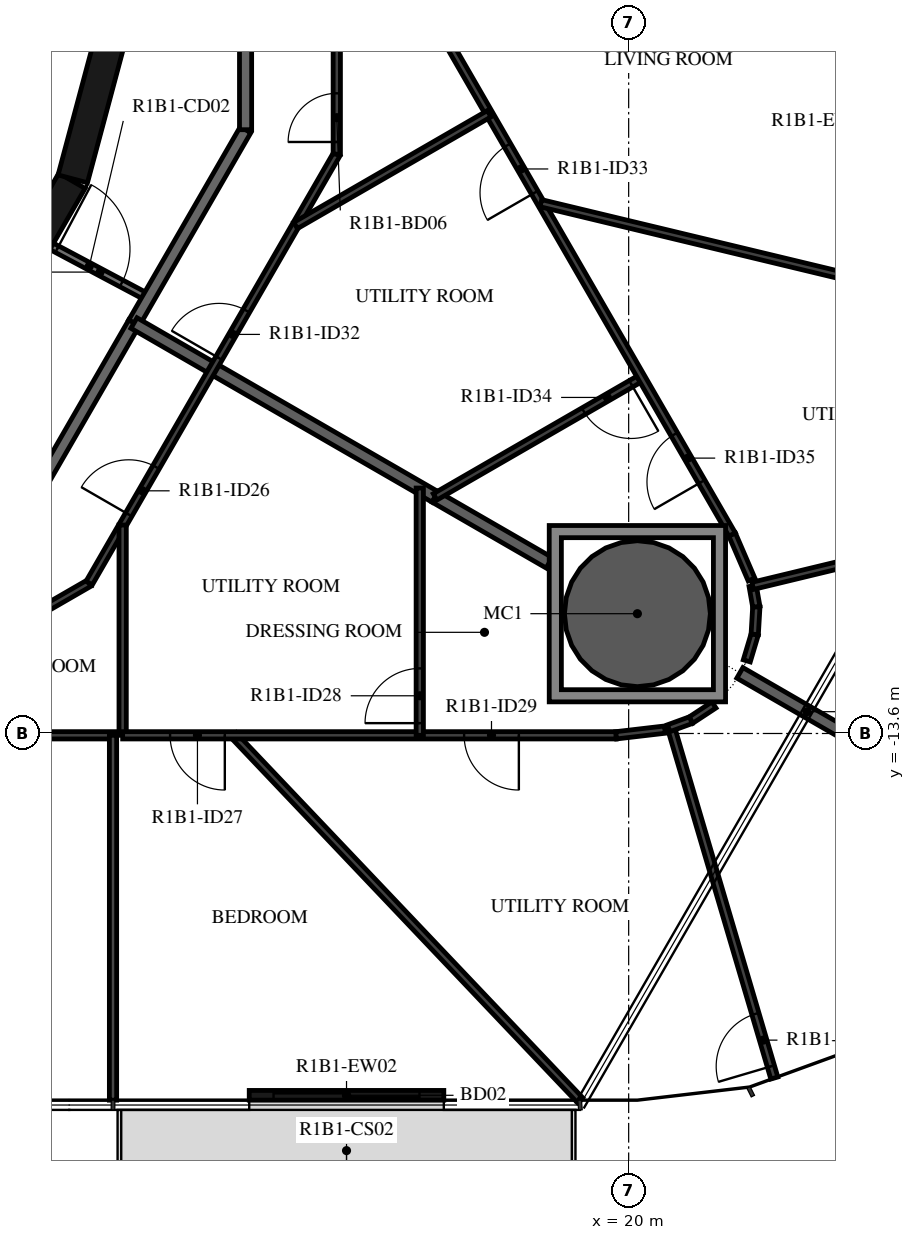
"""IFC4 building model, lengths in metres.
Left out: names, types, materials, properties, quantities, classifications, styles, units other than length and angle.
Written with IfcOpenShell. Run it as: python <this file> out.ifc"""

import sys

from ifc_helpers import new_model, si_unit, direction, frame, frame_2d, origin, origin_2d, place, context, subcontext, project, spatial, polyline, rectangle, hollow_circle, outline, extrude, element, fill, save


model = new_model("IFC4")
c1 = context("Model", 3, precision=1e-05, world=origin(), true_north=direction((0.0, 1.0)))
c2 = subcontext(c1, "Body", "Model", "MODEL_VIEW")
j1 = project(units=[si_unit("LENGTHUNIT", "METRE"), si_unit("PLANEANGLEUNIT", "RADIAN")], contexts=[c1])
p1 = place(None, origin())
s1 = spatial("IfcSite", under=j1, at=p1, CompositionType="ELEMENT")
p2 = place(p1, origin())
s2 = spatial("IfcBuilding", under=s1, at=p2, CompositionType="ELEMENT")
p3 = place(p2, frame((0.0, 0.0, 48.9)))
s3 = spatial("IfcBuildingStorey", under=s2, at=p3, CompositionType="ELEMENT", Elevation=48.9)
p4 = place(p3, frame((20.144, -11.63, -0.38), z_axis=(0.0, 0.0, 1.0), x_axis=(1.0, 0.0, 0.0)))
e1 = element("IfcColumn", 1, at=p4, inside=s3, PredefinedType="COLUMN", context=c2, shape_type="SweptSolid", body=[
    extrude(hollow_circle(Radius=1.2, WallThickness=0.06, at=origin_2d()), origin(), (0.0, 0.0, 1.0), 3.5),
])
p5 = place(p3, frame((13.76, -19.55, 0.0), z_axis=(0.0, 0.0, 1.0), x_axis=(1.0, 0.0, 0.0)))
e2 = element("IfcWall", 2, at=p5, inside=s3, PredefinedType="STANDARD", context=c2, shape_type="SweptSolid", body=[
    extrude(rectangle(XDim=3.2, YDim=0.16, at=frame_2d((1.6, 0.0))), origin(), (0.0, 0.0, 1.0), 3.12),
])
p6 = place(p5, frame((0.4, 0.0, 0.0)))
e3 = element("IfcOpeningElement", 3, at=p6, cuts=e2, PredefinedType="OPENING", context=c2, shape_type="SweptSolid", body=[
    extrude(rectangle(XDim=2.4, YDim=2.4, at=frame_2d((1.2, 1.2))), frame((0.0, 0.09, 0.0), z_axis=(0.0, -1.0, 0.0), x_axis=(1.0, 0.0, 0.0)), (0.0, 0.0, 1.0), 0.18),
])
for number, where, z_axis, x_axis in (
    (4, (9.329, -7.137, 0.0), (0.0, 0.0, 1.0), (0.5, 0.866, 0.0)),
    (5, (10.858, -4.479, 0.0), (0.0, 0.0, 1.0), (0.259, 0.966, 0.0)),
):
    element("IfcWall", number, at=place(p3, frame(where, z_axis=z_axis, x_axis=x_axis)), inside=s3, PredefinedType="SHEAR", context=c2, shape_type="SweptSolid", body=[
        extrude(rectangle(XDim=3.033, YDim=0.5, at=frame_2d((1.516, 0.0))), origin(), (0.0, 0.0, 1.0), 3.12),
    ])
p7 = place(p3, frame((10.511, -5.589, 0.0), z_axis=(0.0, 0.0, 1.0), x_axis=(0.88294043061, -0.469485032769, 0.0)))
e6 = element("IfcWall", 6, at=p7, inside=s3, PredefinedType="PARTITIONING", context=c2, shape_type="SweptSolid", body=[
    extrude(rectangle(XDim=1.804, YDim=0.12, at=frame_2d((0.902, 0.0))), origin(), (0.0, 0.0, 1.0), 3.12),
])
p8 = place(p7, frame((0.1, 0.0, 0.0)))
e7 = element("IfcOpeningElement", 7, at=p8, cuts=e6, PredefinedType="OPENING", context=c2, shape_type="SweptSolid", body=[
    extrude(rectangle(XDim=1.2, YDim=2.1, at=frame_2d((0.6, 1.05))), frame((0.0, 0.07, 0.0), z_axis=(0.0, -1.0, 0.0), x_axis=(1.0, 0.0, 0.0)), (0.0, 0.0, 1.0), 0.14),
])
p9 = place(p3, frame((11.865, -6.85, 0.0), z_axis=(0.0, 0.0, 1.0), x_axis=(0.499987270552, 0.86603275301, 0.0)))
e8 = element("IfcWall", 8, at=p9, inside=s3, PredefinedType="STANDARD", context=c2, shape_type="SweptSolid", body=[
    extrude(rectangle(XDim=3.671, YDim=0.2, at=frame_2d((1.835, 0.0))), origin(), (0.0, 0.0, 1.0), 3.12),
])
p10 = place(p3, frame((13.7, -3.671, 0.0), z_axis=(0.0, 0.0, 1.0), x_axis=(0.0, 1.0, 0.0)))
e9 = element("IfcWall", 9, at=p10, inside=s3, PredefinedType="STANDARD", context=c2, shape_type="SweptSolid", body=[
    extrude(rectangle(XDim=7.146, YDim=0.2, at=frame_2d((3.573, 0.0))), origin(), (0.0, 0.0, 1.0), 3.12),
])
p11 = place(p10, frame((5.947, 0.0, 0.0)))
e10 = element("IfcOpeningElement", 10, at=p11, cuts=e9, PredefinedType="OPENING", context=c2, shape_type="SweptSolid", body=[
    extrude(rectangle(XDim=1.0, YDim=2.1, at=frame_2d((0.5, 1.05))), frame((0.0, 0.11, 0.0), z_axis=(0.0, -1.0, 0.0), x_axis=(1.0, 0.0, 0.0)), (0.0, 0.0, 1.0), 0.22),
])
p12 = place(p3, frame((10.029, -10.029, 0.0), z_axis=(0.0, 0.0, 1.0), x_axis=(0.50001606911, 0.866016126081, 0.0)))
e11 = element("IfcWall", 11, at=p12, inside=s3, PredefinedType="STANDARD", context=c2, shape_type="SweptSolid", body=[
    extrude(rectangle(XDim=3.671, YDim=0.2, at=frame_2d((1.835, 0.0))), origin(), (0.0, 0.0, 1.0), 3.12),
])
p13 = place(p3, frame((16.817, -9.709, 0.0), z_axis=(0.0, 0.0, 1.0), x_axis=(-0.86604338933, 0.499968846828, 0.0)))
e12 = element("IfcWall", 12, at=p13, inside=s3, PredefinedType="STANDARD", context=c2, shape_type="SweptSolid", body=[
    extrude(rectangle(XDim=5.718, YDim=0.2, at=frame_2d((2.859, 0.0))), origin(), (0.0, 0.0, 1.0), 3.12),
])
p14 = place(p3, frame((27.025, -15.603, 0.0), z_axis=(0.0, 0.0, 1.0), x_axis=(-0.866020924479, 0.500007758305, 0.0)))
e13 = element("IfcWall", 13, at=p14, inside=s3, PredefinedType="STANDARD", context=c2, shape_type="SweptSolid", body=[
    extrude(rectangle(XDim=6.0, YDim=0.2, at=frame_2d((3.0, 0.0))), origin(), (0.0, 0.0, 1.0), 3.12),
])
p15 = place(p3, frame((18.694, -10.793, 0.0), z_axis=(0.0, 0.0, 1.0), x_axis=(-0.866009251978, 0.500027974705, 0.0)))
e14 = element("IfcWall", 14, at=p15, inside=s3, PredefinedType="STANDARD", context=c2, shape_type="SweptSolid", body=[
    extrude(rectangle(XDim=2.167, YDim=0.2, at=frame_2d((1.084, 0.0))), origin(), (0.0, 0.0, 1.0), 3.12),
])
p16 = place(p3, frame((4.613, -14.888, 0.0), z_axis=(0.0, 0.0, 1.0), x_axis=(0.866025608725, 0.499999645032, 0.0)))
e15 = element("IfcWall", 15, at=p16, inside=s3, PredefinedType="PARTITIONING", context=c2, shape_type="SweptSolid", body=[
    extrude(rectangle(XDim=7.522, YDim=0.12, at=frame_2d((3.761, 0.0))), origin(), (0.0, 0.0, 1.0), 3.12),
])
p17 = place(p16, frame((4.017, 0.0, 0.0)))
e16 = element("IfcOpeningElement", 16, at=p17, cuts=e15, PredefinedType="OPENING", context=c2, shape_type="SweptSolid", body=[
    extrude(rectangle(XDim=0.8, YDim=2.1, at=frame_2d((0.4, 1.05))), frame((0.0, 0.07, 0.0), z_axis=(0.0, -1.0, 0.0), x_axis=(1.0, 0.0, 0.0)), (0.0, 0.0, 1.0), 0.14),
])
p18 = place(p3, frame((11.127, -11.127, 0.0), z_axis=(0.0, 0.0, 1.0), x_axis=(0.499987950692, 0.866032360344, 0.0)))
e17 = element("IfcWall", 17, at=p18, inside=s3, PredefinedType="PARTITIONING", context=c2, shape_type="SweptSolid", body=[
    extrude(rectangle(XDim=8.146, YDim=0.12, at=frame_2d((4.073, 0.0))), origin(), (0.0, 0.0, 1.0), 3.12),
])
p19 = place(p18, frame((1.303, 0.0, 0.0)))
e18 = element("IfcOpeningElement", 18, at=p19, cuts=e17, PredefinedType="OPENING", context=c2, shape_type="SweptSolid", body=[
    extrude(rectangle(XDim=0.9, YDim=2.1, at=frame_2d((0.45, 1.05))), frame((0.0, 0.07, 0.0), z_axis=(0.0, -1.0, 0.0), x_axis=(1.0, 0.0, 0.0)), (0.0, 0.0, 1.0), 0.14),
])
p20 = place(p18, frame((4.273, 0.0, 0.0)))
e19 = element("IfcOpeningElement", 19, at=p20, cuts=e17, PredefinedType="OPENING", context=c2, shape_type="SweptSolid", body=[
    extrude(rectangle(XDim=0.9, YDim=2.1, at=frame_2d((0.45, 1.05))), frame((0.0, 0.07, 0.0), z_axis=(0.0, -1.0, 0.0), x_axis=(1.0, 0.0, 0.0)), (0.0, 0.0, 1.0), 0.14),
])
p21 = place(p3, frame((11.56, -13.63, 0.0), z_axis=(0.0, 0.0, 1.0), x_axis=(-1.0, 0.0, 0.0)))
e20 = element("IfcWall", 20, at=p21, inside=s3, PredefinedType="PARTITIONING", context=c2, shape_type="SweptSolid", body=[
    extrude(rectangle(XDim=4.768, YDim=0.12, at=frame_2d((2.384, 0.0))), origin(), (0.0, 0.0, 1.0), 3.12),
])
p22 = place(p3, frame((11.52, -19.63, 0.0), z_axis=(0.0, 0.0, 1.0), x_axis=(0.0, 1.0, 0.0)))
e21 = element("IfcWall", 21, at=p22, inside=s3, PredefinedType="PARTITIONING", context=c2, shape_type="SweptSolid", body=[
    extrude(rectangle(XDim=6.0, YDim=0.12, at=frame_2d((3.0, 0.0))), origin(), (0.0, 0.0, 1.0), 2.73),
])
p23 = place(p3, frame((11.678, -13.63, 0.0), z_axis=(0.0, 0.0, 1.0), x_axis=(0.0, 1.0, 0.0)))
e22 = element("IfcWall", 22, at=p23, inside=s3, PredefinedType="PARTITIONING", context=c2, shape_type="SweptSolid", body=[
    extrude(rectangle(XDim=3.458, YDim=0.12, at=frame_2d((1.729, 0.0))), origin(), (0.0, 0.0, 1.0), 3.12),
])
p24 = place(p3, frame((19.2, -19.63, 0.0), z_axis=(0.0, 0.0, 1.0), x_axis=(-0.688544699396, 0.72519390299, 0.0)))
e23 = element("IfcWall", 23, at=p24, inside=s3, PredefinedType="PARTITIONING", context=c2, shape_type="SweptSolid", body=[
    extrude(rectangle(XDim=8.274, YDim=0.12, at=frame_2d((4.137, 0.0))), origin(), (0.0, 0.0, 1.0), 3.12),
])
p25 = place(p3, frame((19.794, -13.63, 0.0), z_axis=(0.0, 0.0, 1.0), x_axis=(-1.0, 0.0, 0.0)))
e24 = element("IfcWall", 24, at=p25, inside=s3, PredefinedType="PARTITIONING", context=c2, shape_type="SweptSolid", body=[
    extrude(rectangle(XDim=8.116, YDim=0.12, at=frame_2d((4.058, 0.0))), origin(), (0.0, 0.0, 1.0), 3.12),
])
p26 = place(p25, frame((6.436, 0.0, 0.0)))
e25 = element("IfcOpeningElement", 25, at=p26, cuts=e24, PredefinedType="OPENING", context=c2, shape_type="SweptSolid", body=[
    extrude(rectangle(XDim=0.9, YDim=2.1, at=frame_2d((0.45, 1.05))), frame((0.0, 0.07, 0.0), z_axis=(0.0, -1.0, 0.0), x_axis=(1.0, 0.0, 0.0)), (0.0, 0.0, 1.0), 0.14),
])
p27 = place(p25, frame((1.6, 0.0, 0.0)))
e26 = element("IfcOpeningElement", 26, at=p27, cuts=e24, PredefinedType="OPENING", context=c2, shape_type="SweptSolid", body=[
    extrude(rectangle(XDim=0.9, YDim=2.1, at=frame_2d((0.45, 1.05))), frame((0.0, 0.07, 0.0), z_axis=(0.0, -1.0, 0.0), x_axis=(1.0, 0.0, 0.0)), (0.0, 0.0, 1.0), 0.14),
])
p28 = place(p3, frame((22.396, -19.266, 0.0), z_axis=(0.0, 0.0, 1.0), x_axis=(-0.282896205585, 0.959150528783, 0.0)))
e27 = element("IfcWall", 27, at=p28, inside=s3, PredefinedType="PARTITIONING", context=c2, shape_type="SweptSolid", body=[
    extrude(rectangle(XDim=6.012, YDim=0.12, at=frame_2d((3.006, 0.0))), origin(), (0.0, 0.0, 1.0), 3.12),
])
p29 = place(p28, frame((0.2, 0.0, 0.0)))
e28 = element("IfcOpeningElement", 28, at=p29, cuts=e27, PredefinedType="OPENING", context=c2, shape_type="SweptSolid", body=[
    extrude(rectangle(XDim=0.9, YDim=2.1, at=frame_2d((0.45, 1.05))), frame((0.0, 0.07, 0.0), z_axis=(0.0, -1.0, 0.0), x_axis=(1.0, 0.0, 0.0)), (0.0, 0.0, 1.0), 0.14),
])
p30 = place(p3, frame((20.595, -13.536, 0.0), z_axis=(0.0, 0.0, 1.0), x_axis=(-0.993259655268, -0.115910556968, 0.0)))
e29 = element("IfcWall", 29, at=p30, inside=s3, PredefinedType="PARTITIONING", context=c2, shape_type="SweptSolid", body=[
    extrude(rectangle(XDim=0.807, YDim=0.12, at=frame_2d((0.403, 0.0))), origin(), (0.0, 0.0, 1.0), 3.12),
])
p31 = place(p3, frame((16.565, -13.63, 0.0), z_axis=(0.0, 0.0, 1.0), x_axis=(0.0, 1.0, 0.0)))
e30 = element("IfcWall", 30, at=p31, inside=s3, PredefinedType="PARTITIONING", context=c2, shape_type="SweptSolid", body=[
    extrude(rectangle(XDim=4.066, YDim=0.12, at=frame_2d((2.033, 0.0))), origin(), (0.0, 0.0, 1.0), 3.12),
])
p32 = place(p31, frame((0.2, 0.0, 0.0)))
e31 = element("IfcOpeningElement", 31, at=p32, cuts=e30, PredefinedType="OPENING", context=c2, shape_type="SweptSolid", body=[
    extrude(rectangle(XDim=0.9, YDim=2.1, at=frame_2d((0.45, 1.05))), frame((0.0, 0.07, 0.0), z_axis=(0.0, -1.0, 0.0), x_axis=(1.0, 0.0, 0.0)), (0.0, 0.0, 1.0), 0.14),
])
p33 = place(p3, frame((21.403, -13.131, 0.0), z_axis=(0.0, 0.0, 1.0), x_axis=(-0.835339231854, -0.549734815821, 0.0)))
e32 = element("IfcWall", 32, at=p33, inside=s3, PredefinedType="PARTITIONING", context=c2, shape_type="SweptSolid", body=[
    extrude(rectangle(XDim=0.455, YDim=0.12, at=frame_2d((0.228, 0.0))), origin(), (0.0, 0.0, 1.0), 3.12),
])
p34 = place(p3, frame((21.023, -13.381, 0.0), z_axis=(0.0, 0.0, 1.0), x_axis=(-0.939665068469, -0.34209583321, 0.0)))
e33 = element("IfcWall", 33, at=p34, inside=s3, PredefinedType="PARTITIONING", context=c2, shape_type="SweptSolid", body=[
    extrude(rectangle(XDim=0.389, YDim=0.12, at=frame_2d((0.194, 0.0))), origin(), (0.0, 0.0, 1.0), 3.12),
])
p35 = place(p3, frame((15.2, -4.073, 0.0), z_axis=(0.0, 0.0, 1.0), x_axis=(0.0, 1.0, 0.0)))
e34 = element("IfcWall", 34, at=p35, inside=s3, PredefinedType="PARTITIONING", context=c2, shape_type="SweptSolid", body=[
    extrude(rectangle(XDim=5.005, YDim=0.12, at=frame_2d((2.503, 0.0))), origin(), (0.0, 0.0, 1.0), 3.12),
])
p36 = place(p35, frame((0.2, 0.0, 0.0)))
e35 = element("IfcOpeningElement", 35, at=p36, cuts=e34, PredefinedType="OPENING", context=c2, shape_type="SweptSolid", body=[
    extrude(rectangle(XDim=0.8, YDim=2.1, at=frame_2d((0.4, 1.05))), frame((0.0, 0.07, 0.0), z_axis=(0.0, -1.0, 0.0), x_axis=(1.0, 0.0, 0.0)), (0.0, 0.0, 1.0), 0.14),
])
p37 = place(p3, frame((21.942, -12.406, 0.0), z_axis=(0.0, 0.0, 1.0), x_axis=(0.287101711529, 0.957900102953, 0.0)))
e36 = element("IfcWall", 36, at=p37, inside=s3, PredefinedType="PARTITIONING", context=c2, shape_type="SweptSolid", body=[
    extrude(rectangle(XDim=0.455, YDim=0.12, at=frame_2d((0.228, 0.0))), origin(), (0.0, 0.0, 1.0), 3.12),
])
p38 = place(p3, frame((22.073, -11.97, 0.0), z_axis=(0.0, 0.0, 1.0), x_axis=(0.058533144572, 0.998285465679, 0.0)))
e37 = element("IfcWall", 37, at=p38, inside=s3, PredefinedType="PARTITIONING", context=c2, shape_type="SweptSolid", body=[
    extrude(rectangle(XDim=0.455, YDim=0.12, at=frame_2d((0.227, 0.0))), origin(), (0.0, 0.0, 1.0), 3.12),
])
p39 = place(p3, frame((22.1, -11.516, 0.0), z_axis=(0.0, 0.0, 1.0), x_axis=(-0.174264410128, 0.984698895786, 0.0)))
e38 = element("IfcWall", 38, at=p39, inside=s3, PredefinedType="PARTITIONING", context=c2, shape_type="SweptSolid", body=[
    extrude(rectangle(XDim=0.349, YDim=0.12, at=frame_2d((0.174, 0.0))), origin(), (0.0, 0.0, 1.0), 3.12),
])
p40 = place(p3, frame((20.212, -7.749, 0.0), z_axis=(0.0, 0.0, 1.0), x_axis=(-0.86604663799, -0.499963219473, 0.0)))
e39 = element("IfcWall", 39, at=p40, inside=s3, PredefinedType="PARTITIONING", context=c2, shape_type="SweptSolid", body=[
    extrude(rectangle(XDim=3.921, YDim=0.12, at=frame_2d((1.96, 0.0))), origin(), (0.0, 0.0, 1.0), 3.12),
])
p41 = place(p40, frame((0.2, 0.0, 0.0)))
e40 = element("IfcOpeningElement", 40, at=p41, cuts=e39, PredefinedType="OPENING", context=c2, shape_type="SweptSolid", body=[
    extrude(rectangle(XDim=0.9, YDim=2.1, at=frame_2d((0.45, 1.05))), frame((0.0, 0.07, 0.0), z_axis=(0.0, -1.0, 0.0), x_axis=(1.0, 0.0, 0.0)), (0.0, 0.0, 1.0), 0.14),
])
p42 = place(p3, frame((22.021, -11.068, 0.0), z_axis=(0.0, 0.0, 1.0), x_axis=(-0.396036092975, 0.918234944369, 0.0)))
e41 = element("IfcWall", 41, at=p42, inside=s3, PredefinedType="PARTITIONING", context=c2, shape_type="SweptSolid", body=[
    extrude(rectangle(XDim=0.807, YDim=0.12, at=frame_2d((0.403, 0.0))), origin(), (0.0, 0.0, 1.0), 3.12),
])
p43 = place(p3, frame((21.701, -10.327, 0.0), z_axis=(0.0, 0.0, 1.0), x_axis=(-0.500008528526, 0.866020479782, 0.0)))
e42 = element("IfcWall", 42, at=p43, inside=s3, PredefinedType="PARTITIONING", context=c2, shape_type="SweptSolid", body=[
    extrude(rectangle(XDim=13.002, YDim=0.12, at=frame_2d((6.501, 0.0))), origin(), (0.0, 0.0, 1.0), 3.12),
])
p44 = place(p43, frame((6.49, 0.0, 0.0)))
e43 = element("IfcOpeningElement", 43, at=p44, cuts=e42, PredefinedType="OPENING", context=c2, shape_type="SweptSolid", body=[
    extrude(rectangle(XDim=0.9, YDim=2.1, at=frame_2d((0.45, 1.05))), frame((0.0, 0.07, 0.0), z_axis=(0.0, -1.0, 0.0), x_axis=(1.0, 0.0, 0.0)), (0.0, 0.0, 1.0), 0.14),
])
p45 = place(p43, frame((1.0, 0.0, 0.0)))
e44 = element("IfcOpeningElement", 44, at=p45, cuts=e42, PredefinedType="OPENING", context=c2, shape_type="SweptSolid", body=[
    extrude(rectangle(XDim=0.9, YDim=2.1, at=frame_2d((0.45, 1.05))), frame((0.0, 0.07, 0.0), z_axis=(0.0, -1.0, 0.0), x_axis=(1.0, 0.0, 0.0)), (0.0, 0.0, 1.0), 0.14),
])
p46 = place(p3, frame((27.883, -9.762, 0.0), z_axis=(0.0, 0.0, 1.0), x_axis=(-0.972090512558, -0.234606128213, 0.0)))
e45 = element("IfcWall", 45, at=p46, inside=s3, PredefinedType="PARTITIONING", context=c2, shape_type="SweptSolid", body=[
    extrude(rectangle(XDim=6.012, YDim=0.12, at=frame_2d((3.006, 0.0))), origin(), (0.0, 0.0, 1.0), 3.12),
])
p47 = place(p46, frame((0.2, 0.0, 0.0)))
e46 = element("IfcOpeningElement", 46, at=p47, cuts=e45, PredefinedType="OPENING", context=c2, shape_type="SweptSolid", body=[
    extrude(rectangle(XDim=0.9, YDim=2.1, at=frame_2d((0.45, 1.05))), frame((0.0, 0.07, 0.0), z_axis=(0.0, -1.0, 0.0), x_axis=(1.0, 0.0, 0.0)), (0.0, 0.0, 1.0), 0.14),
])
p48 = place(p3, frame((17.706, -3.408, 0.0), z_axis=(0.0, 0.0, 1.0), x_axis=(-0.866027421574, -0.49999650507, 0.0)))
e47 = element("IfcWall", 47, at=p48, inside=s3, PredefinedType="PARTITIONING", context=c2, shape_type="SweptSolid", body=[
    extrude(rectangle(XDim=3.676, YDim=0.12, at=frame_2d((1.838, 0.0))), origin(), (0.0, 0.0, 1.0), 3.12),
])
p49 = place(p3, frame((26.6, -6.813, 0.0), z_axis=(0.0, 0.0, 1.0), x_axis=(-0.972306888212, 0.233707755831, 0.0)))
e48 = element("IfcWall", 48, at=p49, inside=s3, PredefinedType="PARTITIONING", context=c2, shape_type="SweptSolid", body=[
    extrude(rectangle(XDim=8.273, YDim=0.12, at=frame_2d((4.137, 0.0))), origin(), (0.0, 0.0, 1.0), 3.12),
])
p50 = place(p3, origin())
e49 = element("IfcWall", 49, at=p50, inside=s3, PredefinedType="STANDARD", context=c2, shape_type="SweptSolid", body=[
    extrude(outline(polyline([(21.594, -10.18), (21.594, -13.08), (18.694, -13.08), (18.694, -10.18), (21.594, -10.18)]), holes=[polyline([(18.894, -12.88), (21.394, -12.88), (21.394, -10.38), (18.894, -10.38), (18.894, -12.88)])]), origin(), (0.0, 0.0, 1.0), 3.12),
])
p51 = place(p6, origin())
e50 = element("IfcDoor", 50, at=p51, inside=s3, OperationType="DOUBLE_DOOR_SLIDING", PredefinedType="DOOR", context=c2, shape_type="SweptSolid", body=[
    extrude(rectangle(XDim=2.4, YDim=2.4, at=frame_2d((1.2, 1.2))), frame((0.0, 0.025, 0.0), z_axis=(0.0, -1.0, 0.0), x_axis=(1.0, 0.0, 0.0)), (0.0, 0.0, 1.0), 0.05),
])
fill(e3, e50)
p52 = place(p19, origin())
e51 = element("IfcDoor", 51, at=p52, inside=s3, OperationType="SINGLE_SWING_RIGHT", PredefinedType="DOOR", context=c2, shape_type="SweptSolid", body=[
    extrude(rectangle(XDim=0.9, YDim=2.1, at=frame_2d((0.45, 1.05))), frame((0.0, 0.025, 0.0), z_axis=(0.0, -1.0, 0.0), x_axis=(1.0, 0.0, 0.0)), (0.0, 0.0, 1.0), 0.05),
])
fill(e18, e51)
p53 = place(p26, origin())
e52 = element("IfcDoor", 52, at=p53, inside=s3, OperationType="SINGLE_SWING_RIGHT", PredefinedType="DOOR", context=c2, shape_type="SweptSolid", body=[
    extrude(rectangle(XDim=0.9, YDim=2.1, at=frame_2d((0.45, 1.05))), frame((0.0, 0.025, 0.0), z_axis=(0.0, -1.0, 0.0), x_axis=(1.0, 0.0, 0.0)), (0.0, 0.0, 1.0), 0.05),
])
fill(e25, e52)
p54 = place(p32, origin())
e53 = element("IfcDoor", 53, at=p54, inside=s3, OperationType="SINGLE_SWING_RIGHT", PredefinedType="DOOR", context=c2, shape_type="SweptSolid", body=[
    extrude(rectangle(XDim=0.9, YDim=2.1, at=frame_2d((0.45, 1.05))), frame((0.0, 0.025, 0.0), z_axis=(0.0, -1.0, 0.0), x_axis=(1.0, 0.0, 0.0)), (0.0, 0.0, 1.0), 0.05),
])
fill(e31, e53)
p55 = place(p27, origin())
e54 = element("IfcDoor", 54, at=p55, inside=s3, OperationType="SINGLE_SWING_RIGHT", PredefinedType="DOOR", context=c2, shape_type="SweptSolid", body=[
    extrude(rectangle(XDim=0.9, YDim=2.1, at=frame_2d((0.45, 1.05))), frame((0.0, 0.025, 0.0), z_axis=(0.0, -1.0, 0.0), x_axis=(1.0, 0.0, 0.0)), (0.0, 0.0, 1.0), 0.05),
])
fill(e26, e54)
p56 = place(p29, origin())
e55 = element("IfcDoor", 55, at=p56, inside=s3, OperationType="SINGLE_SWING_RIGHT", PredefinedType="DOOR", context=c2, shape_type="SweptSolid", body=[
    extrude(rectangle(XDim=0.9, YDim=2.1, at=frame_2d((0.45, 1.05))), frame((0.0, 0.025, 0.0), z_axis=(0.0, -1.0, 0.0), x_axis=(1.0, 0.0, 0.0)), (0.0, 0.0, 1.0), 0.05),
])
fill(e28, e55)
p57 = place(p20, origin())
e56 = element("IfcDoor", 56, at=p57, inside=s3, OperationType="SINGLE_SWING_LEFT", PredefinedType="DOOR", context=c2, shape_type="SweptSolid", body=[
    extrude(rectangle(XDim=0.9, YDim=2.1, at=frame_2d((0.45, 1.05))), frame((0.0, 0.025, 0.0), z_axis=(0.0, -1.0, 0.0), x_axis=(1.0, 0.0, 0.0)), (0.0, 0.0, 1.0), 0.05),
])
fill(e19, e56)
p58 = place(p36, origin())
e57 = element("IfcDoor", 57, at=p58, inside=s3, OperationType="SINGLE_SWING_LEFT", PredefinedType="DOOR", context=c2, shape_type="SweptSolid", body=[
    extrude(rectangle(XDim=0.8, YDim=2.1, at=frame_2d((0.4, 1.05))), frame((0.0, 0.025, 0.0), z_axis=(0.0, -1.0, 0.0), x_axis=(1.0, 0.0, 0.0)), (0.0, 0.0, 1.0), 0.05),
])
fill(e35, e57)
p59 = place(p44, origin())
e58 = element("IfcDoor", 58, at=p59, inside=s3, OperationType="SINGLE_SWING_LEFT", PredefinedType="DOOR", context=c2, shape_type="SweptSolid", body=[
    extrude(rectangle(XDim=0.9, YDim=2.1, at=frame_2d((0.45, 1.05))), frame((0.0, 0.025, 0.0), z_axis=(0.0, -1.0, 0.0), x_axis=(1.0, 0.0, 0.0)), (0.0, 0.0, 1.0), 0.05),
])
fill(e43, e58)
p60 = place(p41, origin())
e59 = element("IfcDoor", 59, at=p60, inside=s3, OperationType="SINGLE_SWING_LEFT", PredefinedType="DOOR", context=c2, shape_type="SweptSolid", body=[
    extrude(rectangle(XDim=0.9, YDim=2.1, at=frame_2d((0.45, 1.05))), frame((0.0, 0.025, 0.0), z_axis=(0.0, -1.0, 0.0), x_axis=(1.0, 0.0, 0.0)), (0.0, 0.0, 1.0), 0.05),
])
fill(e40, e59)
p61 = place(p45, origin())
e60 = element("IfcDoor", 60, at=p61, inside=s3, OperationType="SINGLE_SWING_LEFT", PredefinedType="DOOR", context=c2, shape_type="SweptSolid", body=[
    extrude(rectangle(XDim=0.9, YDim=2.1, at=frame_2d((0.45, 1.05))), frame((0.0, 0.025, 0.0), z_axis=(0.0, -1.0, 0.0), x_axis=(1.0, 0.0, 0.0)), (0.0, 0.0, 1.0), 0.05),
])
fill(e44, e60)
p62 = place(p8, origin())
e61 = element("IfcDoor", 61, at=p62, inside=s3, OperationType="DOUBLE_DOOR_SINGLE_SWING", PredefinedType="DOOR", context=c2, shape_type="SweptSolid", body=[
    extrude(rectangle(XDim=1.2, YDim=2.1, at=frame_2d((0.6, 1.05))), frame((0.0, 0.025, 0.0), z_axis=(0.0, -1.0, 0.0), x_axis=(1.0, 0.0, 0.0)), (0.0, 0.0, 1.0), 0.05),
])
fill(e7, e61)
save(model, sys.argv[1])
